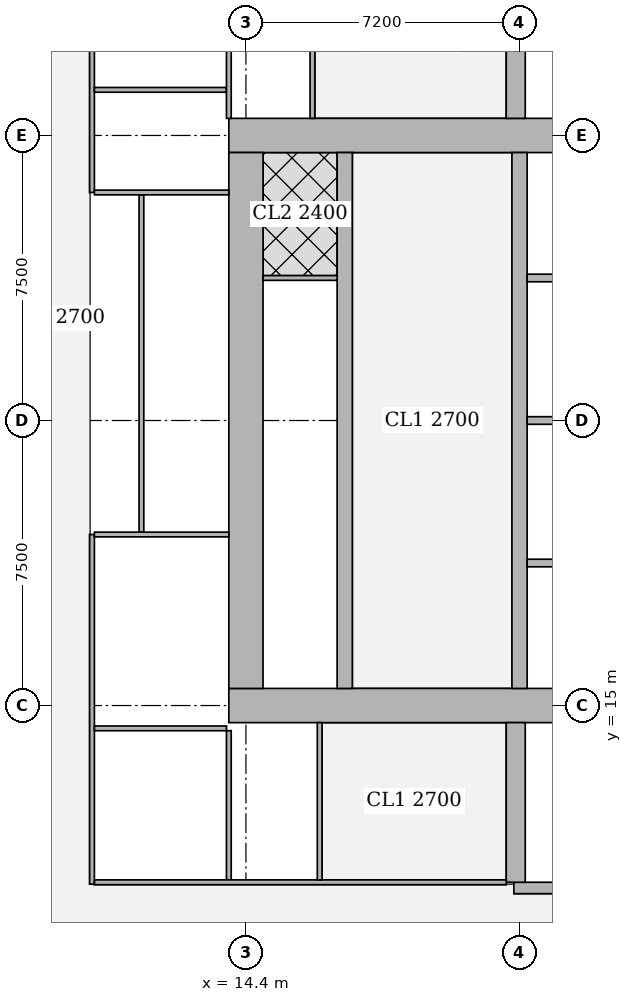
"""IFC4 building model, lengths in metres.
Left out: names, types, materials, properties, quantities, classifications, styles, units other than length and angle.
Written with IfcOpenShell. Run it as: python <this file> out.ifc"""

import sys

from ifc_helpers import new_model, si_unit, direction, frame, frame_2d, origin, place, context, subcontext, project, spatial, rectangle, extrude, element, fill, save


model = new_model("IFC4")
c1 = context("Model", 3, precision=1e-05, world=origin(), true_north=direction((0.0, 1.0)))
c2 = subcontext(c1, "Body", "Model", "MODEL_VIEW")
j1 = project(units=[si_unit("LENGTHUNIT", "METRE"), si_unit("PLANEANGLEUNIT", "RADIAN")], contexts=[c1])
p1 = place(None, origin())
s1 = spatial("IfcSite", under=j1, at=p1, CompositionType="ELEMENT")
p2 = place(p1, origin())
s2 = spatial("IfcBuilding", under=s1, at=p2, CompositionType="ELEMENT")
p3 = place(p2, frame((0.0, 0.0, 158.3)))
s3 = spatial("IfcBuildingStorey", under=s2, at=p3, CompositionType="ELEMENT", Elevation=158.3)
p4 = place(p3, frame((13.95, 15.0, 0.0), z_axis=(0.0, 0.0, 1.0), x_axis=(1.0, 0.0, 0.0)))
e1 = element("IfcWall", 1, at=p4, inside=s3, PredefinedType="SHEAR", context=c2, shape_type="SweptSolid", body=[
    extrude(rectangle(XDim=15.3, YDim=0.9, at=frame_2d((7.65, 0.0))), origin(), (0.0, 0.0, 1.0), 3.75),
])
p5 = place(p4, frame((4.45, 0.0, 0.0)))
e2 = element("IfcOpeningElement", 2, at=p5, cuts=e1, PredefinedType="OPENING", context=c2, shape_type="SweptSolid", body=[
    extrude(rectangle(XDim=1.8, YDim=2.1, at=frame_2d((0.9, 1.05))), frame((0.0, 0.46, 0.0), z_axis=(0.0, -1.0, 0.0), x_axis=(1.0, 0.0, 0.0)), (0.0, 0.0, 1.0), 0.92),
])
p6 = place(p4, frame((10.7, 0.0, 0.0)))
e3 = element("IfcOpeningElement", 3, at=p6, cuts=e1, PredefinedType="OPENING", context=c2, shape_type="SweptSolid", body=[
    extrude(rectangle(XDim=1.1, YDim=2.1, at=frame_2d((0.55, 1.05))), frame((0.0, 0.46, 0.0), z_axis=(0.0, -1.0, 0.0), x_axis=(1.0, 0.0, 0.0)), (0.0, 0.0, 1.0), 0.92),
])
p7 = place(p3, frame((13.95, 30.0, 0.0), z_axis=(0.0, 0.0, 1.0), x_axis=(1.0, 0.0, 0.0)))
e4 = element("IfcWall", 4, at=p7, inside=s3, PredefinedType="SHEAR", context=c2, shape_type="SweptSolid", body=[
    extrude(rectangle(XDim=15.3, YDim=0.9, at=frame_2d((7.65, 0.0))), origin(), (0.0, 0.0, 1.0), 3.75),
])
p8 = place(p7, frame((4.45, 0.0, 0.0)))
e5 = element("IfcOpeningElement", 5, at=p8, cuts=e4, PredefinedType="OPENING", context=c2, shape_type="SweptSolid", body=[
    extrude(rectangle(XDim=1.8, YDim=2.1, at=frame_2d((0.9, 1.05))), frame((0.0, 0.46, 0.0), z_axis=(0.0, -1.0, 0.0), x_axis=(1.0, 0.0, 0.0)), (0.0, 0.0, 1.0), 0.92),
])
p9 = place(p7, frame((10.7, 0.0, 0.0)))
e6 = element("IfcOpeningElement", 6, at=p9, cuts=e4, PredefinedType="OPENING", context=c2, shape_type="SweptSolid", body=[
    extrude(rectangle(XDim=1.1, YDim=2.1, at=frame_2d((0.55, 1.05))), frame((0.0, 0.46, 0.0), z_axis=(0.0, -1.0, 0.0), x_axis=(1.0, 0.0, 0.0)), (0.0, 0.0, 1.0), 0.92),
])
p10 = place(p3, frame((14.4, 15.45, 0.0), z_axis=(0.0, 0.0, 1.0), x_axis=(0.0, 1.0, 0.0)))
e7 = element("IfcWall", 7, at=p10, inside=s3, PredefinedType="SHEAR", context=c2, shape_type="SweptSolid", body=[
    extrude(rectangle(XDim=14.1, YDim=0.9, at=frame_2d((7.05, 0.0))), origin(), (0.0, 0.0, 1.0), 3.75),
])
p11 = place(p3, frame((17.0, 15.45, 0.0), z_axis=(0.0, 0.0, 1.0), x_axis=(0.0, 1.0, 0.0)))
e8 = element("IfcWall", 8, at=p11, inside=s3, PredefinedType="SHEAR", context=c2, shape_type="SweptSolid", body=[
    extrude(rectangle(XDim=14.1, YDim=0.4, at=frame_2d((7.05, 0.0))), origin(), (0.0, 0.0, 1.0), 3.75),
])
p12 = place(p11, frame((0.925, 0.0, 0.0)))
e9 = element("IfcOpeningElement", 9, at=p12, cuts=e8, PredefinedType="OPENING", context=c2, shape_type="SweptSolid", body=[
    extrude(rectangle(XDim=1.0, YDim=2.1, at=frame_2d((0.5, 1.05))), frame((0.0, 0.21, 0.0), z_axis=(0.0, -1.0, 0.0), x_axis=(1.0, 0.0, 0.0)), (0.0, 0.0, 1.0), 0.42),
])
p13 = place(p11, frame((4.675, 0.0, 0.0)))
e10 = element("IfcOpeningElement", 10, at=p13, cuts=e8, PredefinedType="OPENING", context=c2, shape_type="SweptSolid", body=[
    extrude(rectangle(XDim=1.0, YDim=2.1, at=frame_2d((0.5, 1.05))), frame((0.0, 0.21, 0.0), z_axis=(0.0, -1.0, 0.0), x_axis=(1.0, 0.0, 0.0)), (0.0, 0.0, 1.0), 0.42),
])
p14 = place(p11, frame((8.425, 0.0, 0.0)))
e11 = element("IfcOpeningElement", 11, at=p14, cuts=e8, PredefinedType="OPENING", context=c2, shape_type="SweptSolid", body=[
    extrude(rectangle(XDim=1.0, YDim=2.1, at=frame_2d((0.5, 1.05))), frame((0.0, 0.21, 0.0), z_axis=(0.0, -1.0, 0.0), x_axis=(1.0, 0.0, 0.0)), (0.0, 0.0, 1.0), 0.42),
])
p15 = place(p11, frame((12.175, 0.0, 0.0)))
e12 = element("IfcOpeningElement", 12, at=p15, cuts=e8, PredefinedType="OPENING", context=c2, shape_type="SweptSolid", body=[
    extrude(rectangle(XDim=1.0, YDim=2.1, at=frame_2d((0.5, 1.05))), frame((0.0, 0.21, 0.0), z_axis=(0.0, -1.0, 0.0), x_axis=(1.0, 0.0, 0.0)), (0.0, 0.0, 1.0), 0.42),
])
p16 = place(p3, frame((21.6, 15.45, 0.0), z_axis=(0.0, 0.0, 1.0), x_axis=(0.0, 1.0, 0.0)))
e13 = element("IfcWall", 13, at=p16, inside=s3, PredefinedType="SHEAR", context=c2, shape_type="SweptSolid", body=[
    extrude(rectangle(XDim=14.1, YDim=0.4, at=frame_2d((7.05, 0.0))), origin(), (0.0, 0.0, 1.0), 3.75),
])
p17 = place(p16, frame((0.875, 0.0, 0.0)))
e14 = element("IfcOpeningElement", 14, at=p17, cuts=e13, PredefinedType="OPENING", context=c2, shape_type="SweptSolid", body=[
    extrude(rectangle(XDim=1.1, YDim=2.1, at=frame_2d((0.55, 1.05))), frame((0.0, 0.21, 0.0), z_axis=(0.0, -1.0, 0.0), x_axis=(1.0, 0.0, 0.0)), (0.0, 0.0, 1.0), 0.42),
])
p18 = place(p16, frame((4.625, 0.0, 0.0)))
e15 = element("IfcOpeningElement", 15, at=p18, cuts=e13, PredefinedType="OPENING", context=c2, shape_type="SweptSolid", body=[
    extrude(rectangle(XDim=1.1, YDim=2.1, at=frame_2d((0.55, 1.05))), frame((0.0, 0.21, 0.0), z_axis=(0.0, -1.0, 0.0), x_axis=(1.0, 0.0, 0.0)), (0.0, 0.0, 1.0), 0.42),
])
p19 = place(p16, frame((8.375, 0.0, 0.0)))
e16 = element("IfcOpeningElement", 16, at=p19, cuts=e13, PredefinedType="OPENING", context=c2, shape_type="SweptSolid", body=[
    extrude(rectangle(XDim=1.1, YDim=2.1, at=frame_2d((0.55, 1.05))), frame((0.0, 0.21, 0.0), z_axis=(0.0, -1.0, 0.0), x_axis=(1.0, 0.0, 0.0)), (0.0, 0.0, 1.0), 0.42),
])
p20 = place(p16, frame((12.125, 0.0, 0.0)))
e17 = element("IfcOpeningElement", 17, at=p20, cuts=e13, PredefinedType="OPENING", context=c2, shape_type="SweptSolid", body=[
    extrude(rectangle(XDim=1.1, YDim=2.1, at=frame_2d((0.55, 1.05))), frame((0.0, 0.21, 0.0), z_axis=(0.0, -1.0, 0.0), x_axis=(1.0, 0.0, 0.0)), (0.0, 0.0, 1.0), 0.42),
])
p21 = place(p3, frame((21.45, 10.2, 0.0), z_axis=(0.0, 0.0, 1.0), x_axis=(1.0, 0.0, 0.0)))
e18 = element("IfcWall", 18, at=p21, inside=s3, PredefinedType="SHEAR", context=c2, shape_type="SweptSolid", body=[
    extrude(rectangle(XDim=7.5, YDim=0.3, at=frame_2d((3.75, 0.0))), origin(), (0.0, 0.0, 1.0), 3.75),
])
p22 = place(p21, frame((0.5, 0.0, 0.0)))
e19 = element("IfcOpeningElement", 19, at=p22, cuts=e18, PredefinedType="OPENING", context=c2, shape_type="SweptSolid", body=[
    extrude(rectangle(XDim=1.1, YDim=2.1, at=frame_2d((0.55, 1.05))), frame((0.0, 0.16, 0.0), z_axis=(0.0, -1.0, 0.0), x_axis=(1.0, 0.0, 0.0)), (0.0, 0.0, 1.0), 0.32),
])
for number, where, z_axis, x_axis in (
    (20, (21.5, 10.35, 0.0), (0.0, 0.0, 1.0), (0.0, 1.0, 0.0)),
    (21, (21.5, 30.45, 0.0), (0.0, 0.0, 1.0), (0.0, 1.0, 0.0)),
):
    element("IfcWall", number, at=place(p3, frame(where, z_axis=z_axis, x_axis=x_axis)), inside=s3, PredefinedType="SHEAR", context=c2, shape_type="SweptSolid", body=[
        extrude(rectangle(XDim=4.2, YDim=0.5, at=frame_2d((2.1, 0.0))), origin(), (0.0, 0.0, 1.0), 3.75),
    ])
p23 = place(p3, frame((10.35, 10.3, 0.0), z_axis=(0.0, 0.0, 1.0), x_axis=(0.0, 1.0, 0.0)))
e22 = element("IfcWall", 22, at=p23, inside=s3, PredefinedType="PARTITIONING", context=c2, shape_type="SweptSolid", body=[
    extrude(rectangle(XDim=9.2, YDim=0.125, at=frame_2d((4.6, 0.0))), origin(), (0.0, 0.0, 1.0), 3.5),
])
p24 = place(p23, frame((1.55, 0.0, 0.0)))
e23 = element("IfcOpeningElement", 23, at=p24, cuts=e22, PredefinedType="OPENING", context=c2, shape_type="SweptSolid", body=[
    extrude(rectangle(XDim=1.0, YDim=2.1, at=frame_2d((0.5, 1.05))), frame((0.0, 0.073, 0.0), z_axis=(0.0, -1.0, 0.0), x_axis=(1.0, 0.0, 0.0)), (0.0, 0.0, 1.0), 0.145),
])
p25 = place(p23, frame((6.15, 0.0, 0.0)))
e24 = element("IfcOpeningElement", 24, at=p25, cuts=e22, PredefinedType="OPENING", context=c2, shape_type="SweptSolid", body=[
    extrude(rectangle(XDim=1.0, YDim=2.1, at=frame_2d((0.5, 1.05))), frame((0.0, 0.073, 0.0), z_axis=(0.0, -1.0, 0.0), x_axis=(1.0, 0.0, 0.0)), (0.0, 0.0, 1.0), 0.145),
])
p26 = place(p3, frame((10.35, 28.5, 0.0), z_axis=(0.0, 0.0, 1.0), x_axis=(0.0, 1.0, 0.0)))
e25 = element("IfcWall", 25, at=p26, inside=s3, PredefinedType="PARTITIONING", context=c2, shape_type="SweptSolid", body=[
    extrude(rectangle(XDim=6.2, YDim=0.125, at=frame_2d((3.1, 0.0))), origin(), (0.0, 0.0, 1.0), 3.5),
])
p27 = place(p26, frame((0.85, 0.0, 0.0)))
e26 = element("IfcOpeningElement", 26, at=p27, cuts=e25, PredefinedType="OPENING", context=c2, shape_type="SweptSolid", body=[
    extrude(rectangle(XDim=1.0, YDim=2.1, at=frame_2d((0.5, 1.05))), frame((0.0, 0.073, 0.0), z_axis=(0.0, -1.0, 0.0), x_axis=(1.0, 0.0, 0.0)), (0.0, 0.0, 1.0), 0.145),
])
p28 = place(p26, frame((3.95, 0.0, 0.0)))
e27 = element("IfcOpeningElement", 27, at=p28, cuts=e25, PredefinedType="OPENING", context=c2, shape_type="SweptSolid", body=[
    extrude(rectangle(XDim=1.0, YDim=2.1, at=frame_2d((0.5, 1.05))), frame((0.0, 0.073, 0.0), z_axis=(0.0, -1.0, 0.0), x_axis=(1.0, 0.0, 0.0)), (0.0, 0.0, 1.0), 0.145),
])
p29 = place(p3, frame((11.65, 19.562, 0.0), z_axis=(0.0, 0.0, 1.0), x_axis=(0.0, 1.0, 0.0)))
e28 = element("IfcWall", 28, at=p29, inside=s3, PredefinedType="PARTITIONING", context=c2, shape_type="SweptSolid", body=[
    extrude(rectangle(XDim=8.876, YDim=0.125, at=frame_2d((4.438, 0.0))), origin(), (0.0, 0.0, 1.0), 3.5),
])
p30 = place(p29, frame((3.938, 0.0, 0.0)))
e29 = element("IfcOpeningElement", 29, at=p30, cuts=e28, PredefinedType="OPENING", context=c2, shape_type="SweptSolid", body=[
    extrude(rectangle(XDim=1.0, YDim=2.1, at=frame_2d((0.5, 1.05))), frame((0.0, 0.073, 0.0), z_axis=(0.0, -1.0, 0.0), x_axis=(1.0, 0.0, 0.0)), (0.0, 0.0, 1.0), 0.145),
])
p31 = place(p3, frame((10.413, 14.4, 0.0), z_axis=(0.0, 0.0, 1.0), x_axis=(1.0, 0.0, 0.0)))
e30 = element("IfcWall", 30, at=p31, inside=s3, PredefinedType="PARTITIONING", context=c2, shape_type="SweptSolid", body=[
    extrude(rectangle(XDim=3.475, YDim=0.125, at=frame_2d((1.737, 0.0))), origin(), (0.0, 0.0, 1.0), 3.5),
])
for number, where, z_axis, x_axis in (
    (31, (10.413, 19.5, 0.0), (0.0, 0.0, 1.0), (1.0, 0.0, 0.0)),
    (32, (10.413, 28.5, 0.0), (0.0, 0.0, 1.0), (1.0, 0.0, 0.0)),
):
    element("IfcWall", number, at=place(p3, frame(where, z_axis=z_axis, x_axis=x_axis)), inside=s3, PredefinedType="PARTITIONING", context=c2, shape_type="SweptSolid", body=[
        extrude(rectangle(XDim=3.537, YDim=0.125, at=frame_2d((1.769, 0.0))), origin(), (0.0, 0.0, 1.0), 3.5),
    ])
p32 = place(p3, frame((10.413, 31.2, 0.0), z_axis=(0.0, 0.0, 1.0), x_axis=(1.0, 0.0, 0.0)))
e33 = element("IfcWall", 33, at=p32, inside=s3, PredefinedType="PARTITIONING", context=c2, shape_type="SweptSolid", body=[
    extrude(rectangle(XDim=3.475, YDim=0.125, at=frame_2d((1.737, 0.0))), origin(), (0.0, 0.0, 1.0), 3.5),
])
p33 = place(p3, frame((13.95, 10.413, 0.0), z_axis=(0.0, 0.0, 1.0), x_axis=(0.0, 1.0, 0.0)))
e34 = element("IfcWall", 34, at=p33, inside=s3, PredefinedType="PARTITIONING", context=c2, shape_type="SweptSolid", body=[
    extrude(rectangle(XDim=3.925, YDim=0.125, at=frame_2d((1.962, 0.0))), origin(), (0.0, 0.0, 1.0), 3.5),
])
p34 = place(p3, frame((13.95, 30.45, 0.0), z_axis=(0.0, 0.0, 1.0), x_axis=(0.0, 1.0, 0.0)))
e35 = element("IfcWall", 35, at=p34, inside=s3, PredefinedType="PARTITIONING", context=c2, shape_type="SweptSolid", body=[
    extrude(rectangle(XDim=4.137, YDim=0.125, at=frame_2d((2.068, 0.0))), origin(), (0.0, 0.0, 1.0), 3.5),
])
p35 = place(p3, frame((10.413, 10.35, 0.0), z_axis=(0.0, 0.0, 1.0), x_axis=(1.0, 0.0, 0.0)))
e36 = element("IfcWall", 36, at=p35, inside=s3, PredefinedType="PARTITIONING", context=c2, shape_type="SweptSolid", body=[
    extrude(rectangle(XDim=10.837, YDim=0.125, at=frame_2d((5.418, 0.0))), origin(), (0.0, 0.0, 1.0), 3.5),
])
p36 = place(p35, frame((7.582, 0.0, 0.0)))
e37 = element("IfcOpeningElement", 37, at=p36, cuts=e36, PredefinedType="OPENING", context=c2, shape_type="SweptSolid", body=[
    extrude(rectangle(XDim=1.8, YDim=2.1, at=frame_2d((0.9, 1.05))), frame((0.0, 0.073, 0.0), z_axis=(0.0, -1.0, 0.0), x_axis=(1.0, 0.0, 0.0)), (0.0, 0.0, 1.0), 0.145),
])
p37 = place(p3, frame((16.34, 10.413, 0.0), z_axis=(0.0, 0.0, 1.0), x_axis=(0.0, 1.0, 0.0)))
e38 = element("IfcWall", 38, at=p37, inside=s3, PredefinedType="PARTITIONING", context=c2, shape_type="SweptSolid", body=[
    extrude(rectangle(XDim=4.137, YDim=0.125, at=frame_2d((2.068, 0.0))), origin(), (0.0, 0.0, 1.0), 3.5),
])
p38 = place(p37, frame((1.512, 0.0, 0.0)))
e39 = element("IfcOpeningElement", 39, at=p38, cuts=e38, PredefinedType="OPENING", context=c2, shape_type="SweptSolid", body=[
    extrude(rectangle(XDim=1.0, YDim=2.1, at=frame_2d((0.5, 1.05))), frame((0.0, 0.073, 0.0), z_axis=(0.0, -1.0, 0.0), x_axis=(1.0, 0.0, 0.0)), (0.0, 0.0, 1.0), 0.145),
])
p39 = place(p3, frame((16.15, 30.45, 0.0), z_axis=(0.0, 0.0, 1.0), x_axis=(0.0, 1.0, 0.0)))
e40 = element("IfcWall", 40, at=p39, inside=s3, PredefinedType="PARTITIONING", context=c2, shape_type="SweptSolid", body=[
    extrude(rectangle(XDim=4.137, YDim=0.125, at=frame_2d((2.068, 0.0))), origin(), (0.0, 0.0, 1.0), 3.5),
])
p40 = place(p39, frame((1.625, 0.0, 0.0)))
e41 = element("IfcOpeningElement", 41, at=p40, cuts=e40, PredefinedType="OPENING", context=c2, shape_type="SweptSolid", body=[
    extrude(rectangle(XDim=1.0, YDim=2.1, at=frame_2d((0.5, 1.05))), frame((0.0, 0.073, 0.0), z_axis=(0.0, -1.0, 0.0), x_axis=(1.0, 0.0, 0.0)), (0.0, 0.0, 1.0), 0.145),
])
p41 = place(p3, frame((14.85, 26.25, 0.0), z_axis=(0.0, 0.0, 1.0), x_axis=(1.0, 0.0, 0.0)))
e42 = element("IfcWall", 42, at=p41, inside=s3, PredefinedType="PARTITIONING", context=c2, shape_type="SweptSolid", body=[
    extrude(rectangle(XDim=1.95, YDim=0.125, at=frame_2d((0.975, 0.0))), origin(), (0.0, 0.0, 1.0), 3.5),
])
for number, where, z_axis, x_axis in (
    (43, (21.8, 18.75, 0.0), (0.0, 0.0, 1.0), (1.0, 0.0, 0.0)),
    (44, (21.8, 22.5, 0.0), (0.0, 0.0, 1.0), (1.0, 0.0, 0.0)),
    (45, (21.8, 26.25, 0.0), (0.0, 0.0, 1.0), (1.0, 0.0, 0.0)),
):
    element("IfcWall", number, at=place(p3, frame(where, z_axis=z_axis, x_axis=x_axis)), inside=s3, PredefinedType="SOLIDWALL", context=c2, shape_type="SweptSolid", body=[
        extrude(rectangle(XDim=2.2, YDim=0.2, at=frame_2d((1.1, 0.0))), origin(), (0.0, 0.0, 1.0), 3.5),
    ])
p42 = place(p24, origin())
e46 = element("IfcDoor", 46, at=p42, inside=s3, OperationType="SINGLE_SWING_RIGHT", PredefinedType="DOOR", context=c2, shape_type="SweptSolid", body=[
    extrude(rectangle(XDim=1.0, YDim=2.1, at=frame_2d((0.5, 1.05))), frame((0.0, 0.025, 0.0), z_axis=(0.0, -1.0, 0.0), x_axis=(1.0, 0.0, 0.0)), (0.0, 0.0, 1.0), 0.05),
])
fill(e23, e46)
p43 = place(p25, origin())
e47 = element("IfcDoor", 47, at=p43, inside=s3, OperationType="SINGLE_SWING_LEFT", PredefinedType="DOOR", context=c2, shape_type="SweptSolid", body=[
    extrude(rectangle(XDim=1.0, YDim=2.1, at=frame_2d((0.5, 1.05))), frame((0.0, 0.025, 0.0), z_axis=(0.0, -1.0, 0.0), x_axis=(1.0, 0.0, 0.0)), (0.0, 0.0, 1.0), 0.05),
])
fill(e24, e47)
p44 = place(p30, origin())
e48 = element("IfcDoor", 48, at=p44, inside=s3, OperationType="SINGLE_SWING_RIGHT", PredefinedType="DOOR", context=c2, shape_type="SweptSolid", body=[
    extrude(rectangle(XDim=1.0, YDim=2.1, at=frame_2d((0.5, 1.05))), frame((0.0, 0.025, 0.0), z_axis=(0.0, -1.0, 0.0), x_axis=(1.0, 0.0, 0.0)), (0.0, 0.0, 1.0), 0.05),
])
fill(e29, e48)
p45 = place(p27, origin())
e49 = element("IfcDoor", 49, at=p45, inside=s3, OperationType="SINGLE_SWING_RIGHT", PredefinedType="DOOR", context=c2, shape_type="SweptSolid", body=[
    extrude(rectangle(XDim=1.0, YDim=2.1, at=frame_2d((0.5, 1.05))), frame((0.0, 0.025, 0.0), z_axis=(0.0, -1.0, 0.0), x_axis=(1.0, 0.0, 0.0)), (0.0, 0.0, 1.0), 0.05),
])
fill(e26, e49)
p46 = place(p38, origin())
e50 = element("IfcDoor", 50, at=p46, inside=s3, OperationType="SINGLE_SWING_LEFT", PredefinedType="DOOR", context=c2, shape_type="SweptSolid", body=[
    extrude(rectangle(XDim=1.0, YDim=2.1, at=frame_2d((0.5, 1.05))), frame((0.0, 0.025, 0.0), z_axis=(0.0, -1.0, 0.0), x_axis=(1.0, 0.0, 0.0)), (0.0, 0.0, 1.0), 0.05),
])
fill(e39, e50)
p47 = place(p36, origin())
e51 = element("IfcDoor", 51, at=p47, inside=s3, OperationType="DOUBLE_DOOR_SINGLE_SWING", PredefinedType="DOOR", context=c2, shape_type="SweptSolid", body=[
    extrude(rectangle(XDim=1.8, YDim=2.1, at=frame_2d((0.9, 1.05))), frame((0.0, 0.025, 0.0), z_axis=(0.0, -1.0, 0.0), x_axis=(1.0, 0.0, 0.0)), (0.0, 0.0, 1.0), 0.05),
])
fill(e37, e51)
p48 = place(p40, origin())
e52 = element("IfcDoor", 52, at=p48, inside=s3, OperationType="SINGLE_SWING_RIGHT", PredefinedType="DOOR", context=c2, shape_type="SweptSolid", body=[
    extrude(rectangle(XDim=1.0, YDim=2.1, at=frame_2d((0.5, 1.05))), frame((0.0, 0.025, 0.0), z_axis=(0.0, -1.0, 0.0), x_axis=(1.0, 0.0, 0.0)), (0.0, 0.0, 1.0), 0.05),
])
fill(e41, e52)
p49 = place(p12, origin())
e53 = element("IfcDoor", 53, at=p49, inside=s3, OperationType="SINGLE_SWING_LEFT", PredefinedType="DOOR", context=c2, shape_type="SweptSolid", body=[
    extrude(rectangle(XDim=1.0, YDim=2.1, at=frame_2d((0.5, 1.05))), frame((0.0, 0.025, 0.0), z_axis=(0.0, -1.0, 0.0), x_axis=(1.0, 0.0, 0.0)), (0.0, 0.0, 1.0), 0.05),
])
fill(e9, e53)
p50 = place(p13, origin())
e54 = element("IfcDoor", 54, at=p50, inside=s3, OperationType="SINGLE_SWING_LEFT", PredefinedType="DOOR", context=c2, shape_type="SweptSolid", body=[
    extrude(rectangle(XDim=1.0, YDim=2.1, at=frame_2d((0.5, 1.05))), frame((0.0, 0.025, 0.0), z_axis=(0.0, -1.0, 0.0), x_axis=(1.0, 0.0, 0.0)), (0.0, 0.0, 1.0), 0.05),
])
fill(e10, e54)
p51 = place(p14, origin())
e55 = element("IfcDoor", 55, at=p51, inside=s3, OperationType="SINGLE_SWING_RIGHT", PredefinedType="DOOR", context=c2, shape_type="SweptSolid", body=[
    extrude(rectangle(XDim=1.0, YDim=2.1, at=frame_2d((0.5, 1.05))), frame((0.0, 0.025, 0.0), z_axis=(0.0, -1.0, 0.0), x_axis=(1.0, 0.0, 0.0)), (0.0, 0.0, 1.0), 0.05),
])
fill(e11, e55)
p52 = place(p15, origin())
e56 = element("IfcDoor", 56, at=p52, inside=s3, OperationType="SINGLE_SWING_RIGHT", PredefinedType="DOOR", context=c2, shape_type="SweptSolid", body=[
    extrude(rectangle(XDim=1.0, YDim=2.1, at=frame_2d((0.5, 1.05))), frame((0.0, 0.025, 0.0), z_axis=(0.0, -1.0, 0.0), x_axis=(1.0, 0.0, 0.0)), (0.0, 0.0, 1.0), 0.05),
])
fill(e12, e56)
p53 = place(p5, origin())
e57 = element("IfcDoor", 57, at=p53, inside=s3, OperationType="DOUBLE_DOOR_SINGLE_SWING", PredefinedType="DOOR", context=c2, shape_type="SweptSolid", body=[
    extrude(rectangle(XDim=1.8, YDim=2.1, at=frame_2d((0.9, 1.05))), frame((0.0, 0.025, 0.0), z_axis=(0.0, -1.0, 0.0), x_axis=(1.0, 0.0, 0.0)), (0.0, 0.0, 1.0), 0.05),
])
fill(e2, e57)
p54 = place(p8, origin())
e58 = element("IfcDoor", 58, at=p54, inside=s3, OperationType="DOUBLE_DOOR_SINGLE_SWING", PredefinedType="DOOR", context=c2, shape_type="SweptSolid", body=[
    extrude(rectangle(XDim=1.8, YDim=2.1, at=frame_2d((0.9, 1.05))), frame((0.0, 0.025, 0.0), z_axis=(0.0, -1.0, 0.0), x_axis=(1.0, 0.0, 0.0)), (0.0, 0.0, 1.0), 0.05),
])
fill(e5, e58)
p55 = place(p17, origin())
e59 = element("IfcDoor", 59, at=p55, inside=s3, OperationType="DOUBLE_DOOR_SLIDING", PredefinedType="DOOR", context=c2, shape_type="SweptSolid", body=[
    extrude(rectangle(XDim=1.1, YDim=2.1, at=frame_2d((0.55, 1.05))), frame((0.0, 0.025, 0.0), z_axis=(0.0, -1.0, 0.0), x_axis=(1.0, 0.0, 0.0)), (0.0, 0.0, 1.0), 0.05),
])
fill(e14, e59)
p56 = place(p18, origin())
e60 = element("IfcDoor", 60, at=p56, inside=s3, OperationType="DOUBLE_DOOR_SLIDING", PredefinedType="DOOR", context=c2, shape_type="SweptSolid", body=[
    extrude(rectangle(XDim=1.1, YDim=2.1, at=frame_2d((0.55, 1.05))), frame((0.0, 0.025, 0.0), z_axis=(0.0, -1.0, 0.0), x_axis=(1.0, 0.0, 0.0)), (0.0, 0.0, 1.0), 0.05),
])
fill(e15, e60)
p57 = place(p19, origin())
e61 = element("IfcDoor", 61, at=p57, inside=s3, OperationType="DOUBLE_DOOR_SLIDING", PredefinedType="DOOR", context=c2, shape_type="SweptSolid", body=[
    extrude(rectangle(XDim=1.1, YDim=2.1, at=frame_2d((0.55, 1.05))), frame((0.0, 0.025, 0.0), z_axis=(0.0, -1.0, 0.0), x_axis=(1.0, 0.0, 0.0)), (0.0, 0.0, 1.0), 0.05),
])
fill(e16, e61)
p58 = place(p20, origin())
e62 = element("IfcDoor", 62, at=p58, inside=s3, OperationType="DOUBLE_DOOR_SLIDING", PredefinedType="DOOR", context=c2, shape_type="SweptSolid", body=[
    extrude(rectangle(XDim=1.1, YDim=2.1, at=frame_2d((0.55, 1.05))), frame((0.0, 0.025, 0.0), z_axis=(0.0, -1.0, 0.0), x_axis=(1.0, 0.0, 0.0)), (0.0, 0.0, 1.0), 0.05),
])
fill(e17, e62)
p59 = place(p22, origin())
e63 = element("IfcDoor", 63, at=p59, inside=s3, OperationType="SINGLE_SWING_LEFT", PredefinedType="DOOR", context=c2, shape_type="SweptSolid", body=[
    extrude(rectangle(XDim=1.1, YDim=2.1, at=frame_2d((0.55, 1.05))), frame((0.0, 0.025, 0.0), z_axis=(0.0, -1.0, 0.0), x_axis=(1.0, 0.0, 0.0)), (0.0, 0.0, 1.0), 0.05),
])
fill(e19, e63)
save(model, sys.argv[1])
